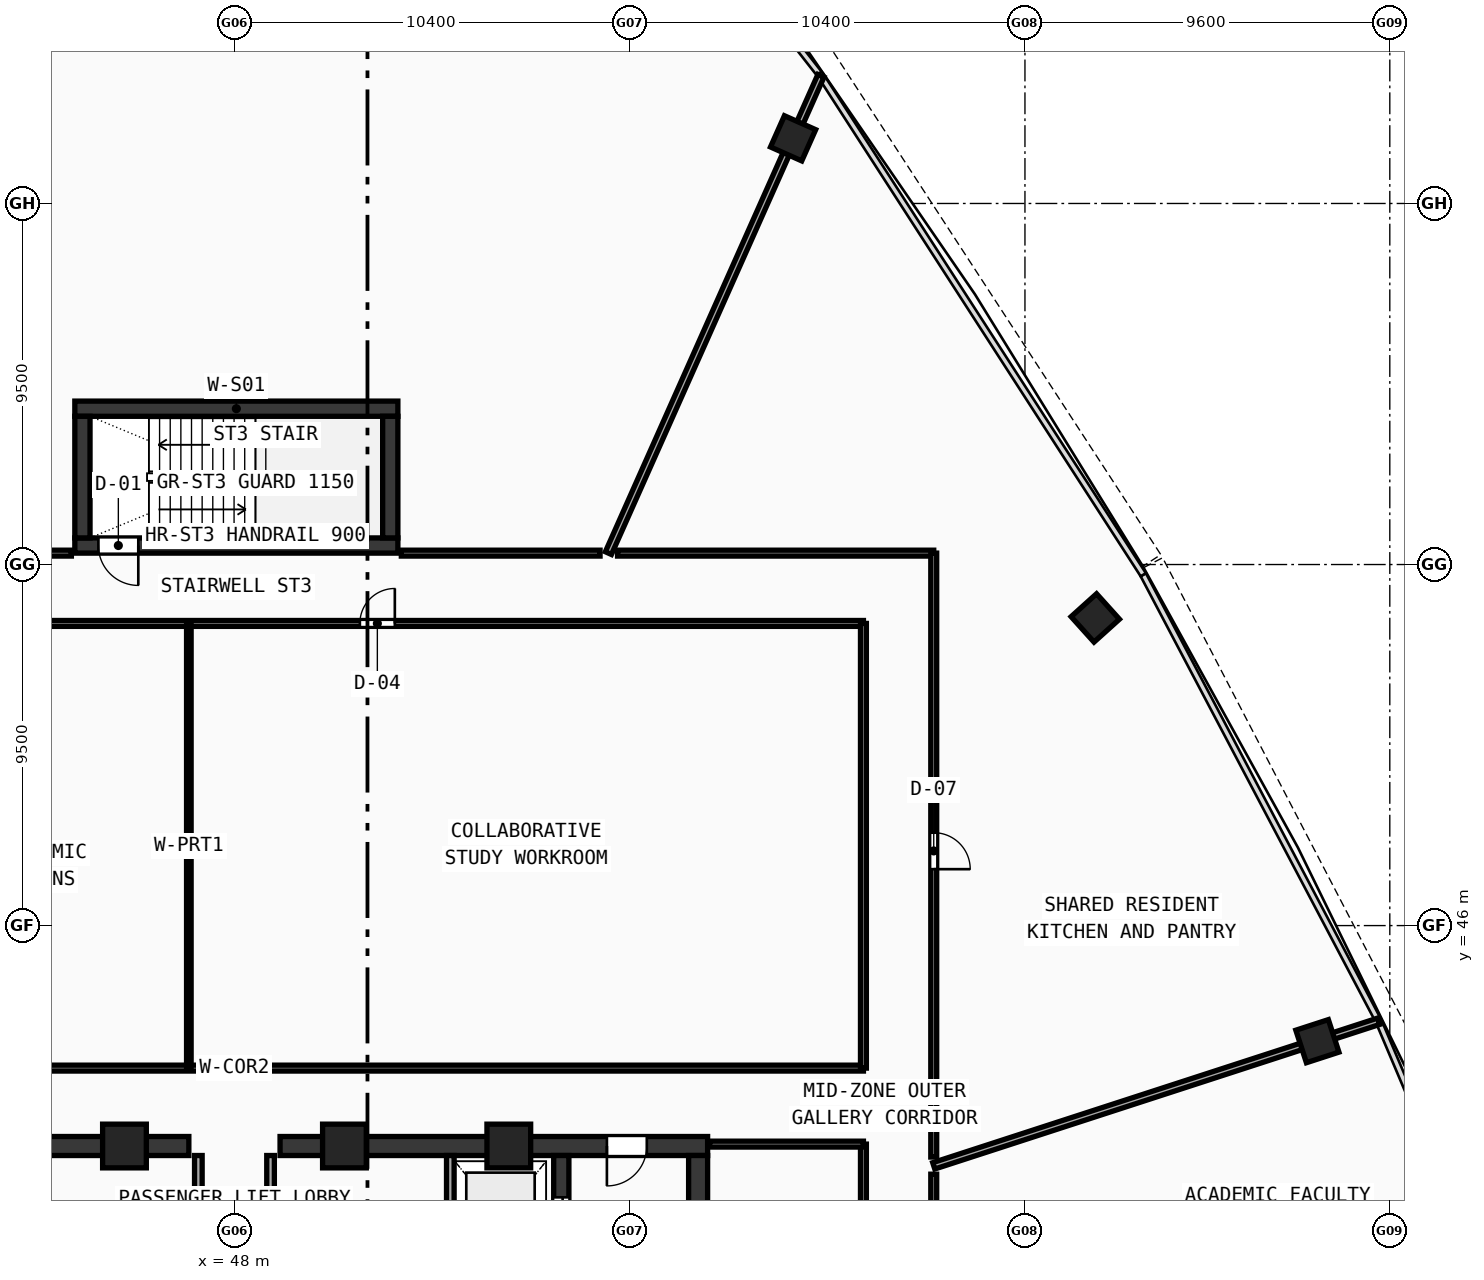
"""IFC4 building model, lengths in metres.
Left out: names, types, materials, properties, quantities, classifications, styles, units other than length and angle.
Written with IfcOpenShell. Run it as: python <this file> out.ifc"""

import sys

from ifc_helpers import new_model, si_unit, direction, frame, frame_2d, origin, origin_with_axes, origin_2d, place, context, subcontext, project, spatial, rectangle, hollow_rectangle, extrude, source, transform, mapped, element, fill, save


model = new_model("IFC4")
c1 = context("Model", 3, precision=1e-05, world=origin(), true_north=direction((0.0, 1.0)))
c2 = subcontext(c1, "Body", "Model", "MODEL_VIEW")
j1 = project(units=[si_unit("LENGTHUNIT", "METRE"), si_unit("PLANEANGLEUNIT", "RADIAN")], contexts=[c1])
p1 = place(None, origin())
s1 = spatial("IfcSite", under=j1, at=p1, CompositionType="ELEMENT")
p2 = place(p1, origin())
s2 = spatial("IfcBuilding", under=s1, at=p2, CompositionType="ELEMENT")
p3 = place(p2, frame((0.0, 0.0, 207.56)))
s3 = spatial("IfcBuildingStorey", under=s2, at=p3, CompositionType="ELEMENT", Elevation=207.56)
p4 = place(p3, frame((35.55, 40.2, 0.0), z_axis=(0.0, 0.0, 1.0), x_axis=(1.0, 0.0, 0.0)))
e1 = element("IfcWall", 1, at=p4, inside=s3, PredefinedType="SHEAR", context=c2, shape_type="SweptSolid", body=[
    extrude(rectangle(XDim=11.25, YDim=0.5, at=frame_2d((5.625, 0.0))), origin(), (0.0, 0.0, 1.0), 3.54),
])
p5 = place(p4, frame((1.6, 0.0, 0.0)))
e2 = element("IfcOpeningElement", 2, at=p5, cuts=e1, PredefinedType="OPENING", context=c2, shape_type="SweptSolid", body=[
    extrude(rectangle(XDim=1.05, YDim=2.1, at=frame_2d((0.525, 1.05))), frame((0.0, 0.26, 0.0), z_axis=(0.0, -1.0, 0.0), x_axis=(1.0, 0.0, 0.0)), (0.0, 0.0, 1.0), 0.52),
])
p6 = place(p3, frame((49.2, 40.2, 0.0), z_axis=(0.0, 0.0, 1.0), x_axis=(1.0, 0.0, 0.0)))
e3 = element("IfcWall", 3, at=p6, inside=s3, PredefinedType="SHEAR", context=c2, shape_type="SweptSolid", body=[
    extrude(rectangle(XDim=11.25, YDim=0.5, at=frame_2d((5.625, 0.0))), origin(), (0.0, 0.0, 1.0), 3.54),
])
p7 = place(p6, frame((8.6, 0.0, 0.0)))
e4 = element("IfcOpeningElement", 4, at=p7, cuts=e3, PredefinedType="OPENING", context=c2, shape_type="SweptSolid", body=[
    extrude(rectangle(XDim=1.05, YDim=2.1, at=frame_2d((0.525, 1.05))), frame((0.0, 0.26, 0.0), z_axis=(0.0, -1.0, 0.0), x_axis=(1.0, 0.0, 0.0)), (0.0, 0.0, 1.0), 0.52),
])
p8 = place(p3, frame((60.2, 27.75, 0.0), z_axis=(0.0, 0.0, 1.0), x_axis=(0.0, 1.0, 0.0)))
e5 = element("IfcWall", 5, at=p8, inside=s3, PredefinedType="SHEAR", context=c2, shape_type="SweptSolid", body=[
    extrude(rectangle(XDim=12.2, YDim=0.5, at=frame_2d((6.1, 0.0))), origin(), (0.0, 0.0, 1.0), 3.54),
])
p9 = place(p3, frame((56.6, 27.75, 0.0), z_axis=(0.0, 0.0, 1.0), x_axis=(0.0, 1.0, 0.0)))
e6 = element("IfcWall", 6, at=p9, inside=s3, PredefinedType="SHEAR", context=c2, shape_type="SweptSolid", body=[
    extrude(rectangle(XDim=12.2, YDim=0.4, at=frame_2d((6.1, 0.0))), origin(), (0.0, 0.0, 1.0), 3.54),
])
p10 = place(p9, frame((10.0, 0.0, 0.0)))
e7 = element("IfcOpeningElement", 7, at=p10, cuts=e6, PredefinedType="OPENING", context=c2, shape_type="SweptSolid", body=[
    extrude(rectangle(XDim=1.1, YDim=2.1, at=frame_2d((0.55, 1.05))), frame((0.0, 0.21, 0.0), z_axis=(0.0, -1.0, 0.0), x_axis=(1.0, 0.0, 0.0)), (0.0, 0.0, 1.0), 0.42),
])
p11 = place(p3, frame((43.8, 59.6, 0.0), z_axis=(0.0, 0.0, 1.0), x_axis=(1.0, 0.0, 0.0)))
e8 = element("IfcWall", 8, at=p11, inside=s3, PredefinedType="SHEAR", context=c2, shape_type="SweptSolid", body=[
    extrude(rectangle(XDim=8.5, YDim=0.4, at=frame_2d((4.25, 0.0))), origin(), (0.0, 0.0, 1.0), 3.54),
])
p12 = place(p3, frame((43.8, 56.0, 0.0), z_axis=(0.0, 0.0, 1.0), x_axis=(1.0, 0.0, 0.0)))
e9 = element("IfcWall", 9, at=p12, inside=s3, PredefinedType="SHEAR", context=c2, shape_type="SweptSolid", body=[
    extrude(rectangle(XDim=8.5, YDim=0.4, at=frame_2d((4.25, 0.0))), origin(), (0.0, 0.0, 1.0), 3.54),
])
p13 = place(p12, frame((0.62, 0.0, 0.0)))
e10 = element("IfcOpeningElement", 10, at=p13, cuts=e9, PredefinedType="OPENING", context=c2, shape_type="SweptSolid", body=[
    extrude(rectangle(XDim=1.05, YDim=2.1, at=frame_2d((0.525, 1.05))), frame((0.0, 0.21, 0.0), z_axis=(0.0, -1.0, 0.0), x_axis=(1.0, 0.0, 0.0)), (0.0, 0.0, 1.0), 0.42),
])
for number, where, z_axis, x_axis in (
    (11, (44.0, 56.2, 0.0), (0.0, 0.0, 1.0), (0.0, 1.0, 0.0)),
    (12, (52.1, 56.2, 0.0), (0.0, 0.0, 1.0), (0.0, 1.0, 0.0)),
):
    element("IfcWall", number, at=place(p3, frame(where, z_axis=z_axis, x_axis=x_axis)), inside=s3, PredefinedType="SHEAR", context=c2, shape_type="SweptSolid", body=[
        extrude(rectangle(XDim=3.2, YDim=0.4, at=frame_2d((1.6, 0.0))), origin(), (0.0, 0.0, 1.0), 3.54),
    ])
m1 = source(origin(), c2, "Body", "SweptSolid", [
    extrude(hollow_rectangle(XDim=1.15, YDim=1.15, WallThickness=0.048, at=origin_2d()), origin(), (0.0, 0.0, 1.0), 3.8),
])
for number, where, z_axis, x_axis in (
    (13, (55.219, 40.2, -0.26), (0.0, 0.0, 1.0), (1.0, 0.0, 0.0)),
    (14, (50.894, 40.2, -0.26), (0.0, 0.0, 1.0), (1.0, 0.0, 0.0)),
    (15, (45.106, 40.2, -0.26), (0.0, 0.0, 1.0), (1.0, 0.0, 0.0)),
):
    element("IfcColumn", number, at=place(p3, frame(where, z_axis=z_axis, x_axis=x_axis)), inside=s3, PredefinedType="COLUMN", context=c2, shape_type="MappedRepresentation", body=[
        mapped(m1, transform((0.0, 0.0, 0.0), scale=1.0)),
    ])
m2 = source(origin(), c2, "Body", "SweptSolid", [
    extrude(hollow_rectangle(XDim=0.9, YDim=0.9, WallThickness=0.036, at=origin_2d()), origin(), (0.0, 0.0, 1.0), 3.8),
])
for number, where, z_axis, x_axis in (
    (16, (76.495, 42.958, -0.26), (0.0, 0.0, 1.0), (-0.309, 0.951, 0.0)),
    (17, (70.651, 54.095, -0.26), (0.0, 0.0, 1.0), (-0.669, 0.743, 0.0)),
    (18, (62.699, 66.715, -0.26), (0.0, 0.0, 1.0), (-0.914, 0.407, 0.0)),
):
    element("IfcColumn", number, at=place(p3, frame(where, z_axis=z_axis, x_axis=x_axis)), inside=s3, PredefinedType="COLUMN", context=c2, shape_type="MappedRepresentation", body=[
        mapped(m2, transform((0.0, 0.0, 0.0), scale=1.0)),
    ])
p14 = place(p3, frame((53.68, 36.65, 0.0), z_axis=(0.0, 0.0, 1.0), x_axis=(0.0, 1.0, 0.0)))
e19 = element("IfcWall", 19, at=p14, inside=s3, PredefinedType="SOLIDWALL", context=c2, shape_type="SweptSolid", body=[
    extrude(rectangle(XDim=3.3, YDim=0.2, at=frame_2d((1.65, 0.0))), origin(), (0.0, 0.0, 1.0), 3.54),
])
for number, where, z_axis, x_axis in (
    (20, (47.05, 35.85, 0.0), (0.0, 0.0, 1.0), (0.0, 1.0, 0.0)),
    (21, (48.95, 35.85, 0.0), (0.0, 0.0, 1.0), (0.0, 1.0, 0.0)),
):
    element("IfcWall", number, at=place(p3, frame(where, z_axis=z_axis, x_axis=x_axis)), inside=s3, PredefinedType="SOLIDWALL", context=c2, shape_type="SweptSolid", body=[
        extrude(rectangle(XDim=4.1, YDim=0.2, at=frame_2d((2.05, 0.0))), origin(), (0.0, 0.0, 1.0), 3.54),
    ])
p15 = place(p3, frame((31.45, 42.25, 0.0), z_axis=(0.0, 0.0, 1.0), x_axis=(1.0, 0.0, 0.0)))
e22 = element("IfcWall", 22, at=p15, inside=s3, PredefinedType="PARTITIONING", context=c2, shape_type="SweptSolid", body=[
    extrude(rectangle(XDim=33.1, YDim=0.155, at=frame_2d((16.55, 0.0))), origin(), (0.0, 0.0, 1.0), 2.89),
])
p16 = place(p3, frame((31.45, 53.95, 0.0), z_axis=(0.0, 0.0, 1.0), x_axis=(1.0, 0.0, 0.0)))
e23 = element("IfcWall", 23, at=p16, inside=s3, PredefinedType="PARTITIONING", context=c2, shape_type="SweptSolid", body=[
    extrude(rectangle(XDim=33.1, YDim=0.155, at=frame_2d((16.55, 0.0))), origin(), (0.0, 0.0, 1.0), 2.89),
])
p17 = place(p16, frame((8.0, 0.0, 0.0)))
e24 = element("IfcOpeningElement", 24, at=p17, cuts=e23, PredefinedType="OPENING", context=c2, shape_type="SweptSolid", body=[
    extrude(rectangle(XDim=0.92, YDim=2.1, at=frame_2d((0.46, 1.05))), frame((0.0, 0.087, 0.0), z_axis=(0.0, -1.0, 0.0), x_axis=(1.0, 0.0, 0.0)), (0.0, 0.0, 1.0), 0.175),
])
p18 = place(p16, frame((19.85, 0.0, 0.0)))
e25 = element("IfcOpeningElement", 25, at=p18, cuts=e23, PredefinedType="OPENING", context=c2, shape_type="SweptSolid", body=[
    extrude(rectangle(XDim=0.92, YDim=2.1, at=frame_2d((0.46, 1.05))), frame((0.0, 0.087, 0.0), z_axis=(0.0, -1.0, 0.0), x_axis=(1.0, 0.0, 0.0)), (0.0, 0.0, 1.0), 0.175),
])
p19 = place(p3, frame((64.55, 42.25, 0.0), z_axis=(0.0, 0.0, 1.0), x_axis=(0.0, 1.0, 0.0)))
e26 = element("IfcWall", 26, at=p19, inside=s3, PredefinedType="PARTITIONING", context=c2, shape_type="SweptSolid", body=[
    extrude(rectangle(XDim=11.7, YDim=0.155, at=frame_2d((5.85, 0.0))), origin(), (0.0, 0.0, 1.0), 2.89),
])
p20 = place(p3, frame((46.8, 42.25, 0.0), z_axis=(0.0, 0.0, 1.0), x_axis=(0.0, 1.0, 0.0)))
e27 = element("IfcWall", 27, at=p20, inside=s3, PredefinedType="PARTITIONING", context=c2, shape_type="SweptSolid", body=[
    extrude(rectangle(XDim=11.7, YDim=0.12, at=frame_2d((5.85, 0.0))), origin(), (0.0, 0.0, 1.0), 3.14),
])
p21 = place(p3, frame((64.55, 23.65, 0.0), z_axis=(0.0, 0.0, 1.0), x_axis=(0.0, 1.0, 0.0)))
e28 = element("IfcWall", 28, at=p21, inside=s3, PredefinedType="PARTITIONING", context=c2, shape_type="SweptSolid", body=[
    extrude(rectangle(XDim=16.6, YDim=0.155, at=frame_2d((8.3, 0.0))), origin(), (0.0, 0.0, 1.0), 2.89),
])
p22 = place(p21, frame((7.5, 0.0, 0.0)))
e29 = element("IfcOpeningElement", 29, at=p22, cuts=e28, PredefinedType="OPENING", context=c2, shape_type="SweptSolid", body=[
    extrude(rectangle(XDim=0.9, YDim=2.08, at=frame_2d((0.45, 1.04))), frame((0.0, 0.087, 0.0), z_axis=(0.0, -1.0, 0.0), x_axis=(1.0, 0.0, 0.0)), (0.0, 0.0, 1.0), 0.175),
])
p23 = place(p3, frame((60.5, 40.25, 0.0), z_axis=(0.0, 0.0, 1.0), x_axis=(1.0, 0.0, 0.0)))
e30 = element("IfcWall", 30, at=p23, inside=s3, PredefinedType="PARTITIONING", context=c2, shape_type="SweptSolid", body=[
    extrude(rectangle(XDim=4.05, YDim=0.155, at=frame_2d((2.025, 0.0))), origin(), (0.0, 0.0, 1.0), 3.54),
])
p24 = place(p3, frame((66.4, 39.678, 0.0), z_axis=(0.0, 0.0, 1.0), x_axis=(0.951057676857, 0.309013422511, 0.0)))
e31 = element("IfcWall", 31, at=p24, inside=s3, PredefinedType="PARTITIONING", context=c2, shape_type="SweptSolid", body=[
    extrude(rectangle(XDim=12.31, YDim=0.175, at=frame_2d((6.155, 0.0))), origin(), (0.0, 0.0, 1.0), 2.89),
])
p25 = place(p3, frame((57.84, 55.8, 0.0), z_axis=(0.0, 0.0, 1.0), x_axis=(0.406733161266, 0.913547007836, 0.0)))
e32 = element("IfcWall", 32, at=p25, inside=s3, PredefinedType="PARTITIONING", context=c2, shape_type="SweptSolid", body=[
    extrude(rectangle(XDim=13.749, YDim=0.175, at=frame_2d((6.875, 0.0))), origin(), (0.0, 0.0, 1.0), 2.89),
])
p26 = place(p3, frame((38.38, 55.8, 0.0), z_axis=(0.0, 0.0, 1.0), x_axis=(1.0, 0.0, 0.0)))
e33 = element("IfcWall", 33, at=p26, inside=s3, PredefinedType="PARTITIONING", context=c2, shape_type="SweptSolid", body=[
    extrude(rectangle(XDim=5.329, YDim=0.155, at=frame_2d((2.665, 0.0))), origin(), (0.0, 0.0, 1.0), 2.89),
])
p27 = place(p26, frame((2.115, 0.0, 0.0)))
e34 = element("IfcOpeningElement", 34, at=p27, cuts=e33, PredefinedType="OPENING", context=c2, shape_type="SweptSolid", body=[
    extrude(rectangle(XDim=0.96, YDim=2.12, at=frame_2d((0.48, 1.06))), frame((0.0, 0.087, 0.0), z_axis=(0.0, -1.0, 0.0), x_axis=(1.0, 0.0, 0.0)), (0.0, 0.0, 1.0), 0.175),
])
p28 = place(p3, frame((52.391, 55.8, 0.0), z_axis=(0.0, 0.0, 1.0), x_axis=(1.0, 0.0, 0.0)))
e35 = element("IfcWall", 35, at=p28, inside=s3, PredefinedType="PARTITIONING", context=c2, shape_type="SweptSolid", body=[
    extrude(rectangle(XDim=5.229, YDim=0.155, at=frame_2d((2.614, 0.0))), origin(), (0.0, 0.0, 1.0), 2.89),
])
p29 = place(p3, frame((58.08, 55.8, 0.0), z_axis=(0.0, 0.0, 1.0), x_axis=(1.0, 0.0, 0.0)))
e36 = element("IfcWall", 36, at=p29, inside=s3, PredefinedType="PARTITIONING", context=c2, shape_type="SweptSolid", body=[
    extrude(rectangle(XDim=8.32, YDim=0.155, at=frame_2d((4.16, 0.0))), origin(), (0.0, 0.0, 1.0), 3.14),
])
p30 = place(p3, frame((66.4, 55.8, 0.0), z_axis=(0.0, 0.0, 1.0), x_axis=(0.0, -1.0, 0.0)))
e37 = element("IfcWall", 37, at=p30, inside=s3, PredefinedType="PARTITIONING", context=c2, shape_type="SweptSolid", body=[
    extrude(rectangle(XDim=15.89, YDim=0.155, at=frame_2d((7.945, 0.0))), origin(), (0.0, 0.0, 1.0), 2.89),
])
p31 = place(p30, frame((7.356, 0.0, 0.0)))
e38 = element("IfcOpeningElement", 38, at=p31, cuts=e37, PredefinedType="OPENING", context=c2, shape_type="SweptSolid", body=[
    extrude(rectangle(XDim=0.96, YDim=2.12, at=frame_2d((0.48, 1.06))), frame((0.0, 0.087, 0.0), z_axis=(0.0, -1.0, 0.0), x_axis=(1.0, 0.0, 0.0)), (0.0, 0.0, 1.0), 0.175),
])
p32 = place(p3, frame((66.4, 39.459, 0.0), z_axis=(0.0, 0.0, 1.0), x_axis=(0.0, -1.0, 0.0)))
e39 = element("IfcWall", 39, at=p32, inside=s3, PredefinedType="PARTITIONING", context=c2, shape_type="SweptSolid", body=[
    extrude(rectangle(XDim=4.896, YDim=0.155, at=frame_2d((2.448, 0.0))), origin(), (0.0, 0.0, 1.0), 3.14),
])
p33 = place(p32, frame((1.988, 0.0, 0.0)))
e40 = element("IfcOpeningElement", 40, at=p33, cuts=e39, PredefinedType="OPENING", context=c2, shape_type="SweptSolid", body=[
    extrude(rectangle(XDim=0.92, YDim=2.1, at=frame_2d((0.46, 1.05))), frame((0.0, 0.087, 0.0), z_axis=(0.0, -1.0, 0.0), x_axis=(1.0, 0.0, 0.0)), (0.0, 0.0, 1.0), 0.175),
])
m3 = source(origin(), c2, "Body", "SweptSolid", [
    extrude(rectangle(XDim=1.05, YDim=2.1, at=frame_2d((0.525, 1.05))), frame((0.0, 0.025, 0.0), z_axis=(0.0, -1.0, 0.0), x_axis=(1.0, 0.0, 0.0)), (0.0, 0.0, 1.0), 0.05),
])
p34 = place(p7, frame((1.05, 0.0, 0.0), z_axis=(0.0, 0.0, 1.0), x_axis=(-1.0, 0.0, 0.0)))
e41 = element("IfcDoor", 41, at=p34, inside=s3, OperationType="SINGLE_SWING_RIGHT", PredefinedType="DOOR", context=c2, shape_type="MappedRepresentation", body=[
    mapped(m3, transform((0.0, 0.0, 0.0), scale=1.0)),
])
fill(e4, e41)
m4 = source(origin(), c2, "Body", "SweptSolid", [
    extrude(rectangle(XDim=1.1, YDim=2.1, at=frame_2d((0.55, 1.05))), frame((0.0, 0.025, 0.0), z_axis=(0.0, -1.0, 0.0), x_axis=(1.0, 0.0, 0.0)), (0.0, 0.0, 1.0), 0.05),
])
p35 = place(p10, origin_with_axes())
e42 = element("IfcDoor", 42, at=p35, inside=s3, OperationType="DOUBLE_DOOR_SLIDING", PredefinedType="DOOR", context=c2, shape_type="MappedRepresentation", body=[
    mapped(m4, transform((0.0, 0.0, 0.0), scale=1.0)),
])
fill(e7, e42)
p36 = place(p13, frame((1.05, 0.0, 0.0), z_axis=(0.0, 0.0, 1.0), x_axis=(-1.0, 0.0, 0.0)))
e43 = element("IfcDoor", 43, at=p36, inside=s3, OperationType="SINGLE_SWING_LEFT", PredefinedType="DOOR", context=c2, shape_type="MappedRepresentation", body=[
    mapped(m3, transform((0.0, 0.0, 0.0), scale=1.0)),
])
fill(e10, e43)
m5 = source(origin(), c2, "Body", "SweptSolid", [
    extrude(rectangle(XDim=0.92, YDim=2.1, at=frame_2d((0.46, 1.05))), frame((0.0, 0.025, 0.0), z_axis=(0.0, -1.0, 0.0), x_axis=(1.0, 0.0, 0.0)), (0.0, 0.0, 1.0), 0.05),
])
p37 = place(p18, origin_with_axes())
e44 = element("IfcDoor", 44, at=p37, inside=s3, OperationType="SINGLE_SWING_RIGHT", PredefinedType="DOOR", context=c2, shape_type="MappedRepresentation", body=[
    mapped(m5, transform((0.0, 0.0, 0.0), scale=1.0)),
])
fill(e25, e44)
m6 = source(origin(), c2, "Body", "SweptSolid", [
    extrude(rectangle(XDim=0.96, YDim=2.12, at=frame_2d((0.48, 1.06))), frame((0.0, 0.025, 0.0), z_axis=(0.0, -1.0, 0.0), x_axis=(1.0, 0.0, 0.0)), (0.0, 0.0, 1.0), 0.05),
])
p38 = place(p31, origin_with_axes())
e45 = element("IfcDoor", 45, at=p38, inside=s3, OperationType="SINGLE_SWING_RIGHT", PredefinedType="DOOR", context=c2, shape_type="MappedRepresentation", body=[
    mapped(m6, transform((0.0, 0.0, 0.0), scale=1.0)),
])
fill(e38, e45)
save(model, sys.argv[1])
